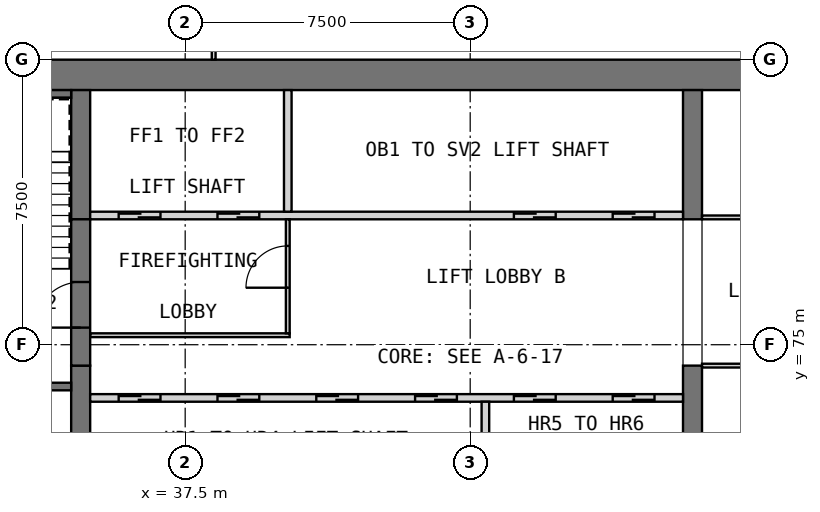
"""IFC4 building model, lengths in metres.
Left out: names, types, materials, properties, quantities, classifications, styles, units other than length and angle.
Written with IfcOpenShell. Run it as: python <this file> out.ifc"""

import sys

from ifc_helpers import new_model, si_unit, direction, frame, frame_2d, origin, place, context, subcontext, project, spatial, rectangle, extrude, element, fill, save


model = new_model("IFC4")
c1 = context("Model", 3, precision=1e-05, world=origin(), true_north=direction((0.0, 1.0)))
c2 = subcontext(c1, "Body", "Model", "MODEL_VIEW")
j1 = project(units=[si_unit("LENGTHUNIT", "METRE"), si_unit("PLANEANGLEUNIT", "RADIAN")], contexts=[c1])
p1 = place(None, origin())
s1 = spatial("IfcSite", under=j1, at=p1, CompositionType="ELEMENT")
p2 = place(p1, origin())
s2 = spatial("IfcBuilding", under=s1, at=p2, CompositionType="ELEMENT")
p3 = place(p2, frame((0.0, 0.0, 162.6)))
s3 = spatial("IfcBuildingStorey", under=s2, at=p3, CompositionType="ELEMENT", Elevation=162.6)
p4 = place(p3, frame((30.0, 82.1, 0.0), z_axis=(0.0, 0.0, 1.0), x_axis=(1.0, 0.0, 0.0)))
e1 = element("IfcWall", 1, at=p4, inside=s3, PredefinedType="SHEAR", context=c2, shape_type="SweptSolid", body=[
    extrude(rectangle(XDim=30.0, YDim=0.8, at=frame_2d((15.0, 0.0))), origin(), (0.0, 0.0, 1.0), 3.6),
])
p5 = place(p3, frame((34.75, 68.05, 0.0), z_axis=(0.0, 0.0, 1.0), x_axis=(0.0, 1.0, 0.0)))
e2 = element("IfcWall", 2, at=p5, inside=s3, PredefinedType="SHEAR", context=c2, shape_type="SweptSolid", body=[
    extrude(rectangle(XDim=6.4, YDim=0.5, at=frame_2d((3.2, 0.0))), origin(), (0.0, 0.0, 1.0), 3.6),
])
p6 = place(p3, frame((34.75, 78.3, 0.0), z_axis=(0.0, 0.0, 1.0), x_axis=(0.0, 1.0, 0.0)))
e3 = element("IfcWall", 3, at=p6, inside=s3, PredefinedType="SHEAR", context=c2, shape_type="SweptSolid", body=[
    extrude(rectangle(XDim=3.4, YDim=0.5, at=frame_2d((1.7, 0.0))), origin(), (0.0, 0.0, 1.0), 3.6),
])
p7 = place(p3, frame((50.85, 68.05, 0.0), z_axis=(0.0, 0.0, 1.0), x_axis=(0.0, 1.0, 0.0)))
e4 = element("IfcWall", 4, at=p7, inside=s3, PredefinedType="SHEAR", context=c2, shape_type="SweptSolid", body=[
    extrude(rectangle(XDim=6.4, YDim=0.5, at=frame_2d((3.2, 0.0))), origin(), (0.0, 0.0, 1.0), 3.6),
])
p8 = place(p3, frame((50.85, 78.3, 0.0), z_axis=(0.0, 0.0, 1.0), x_axis=(0.0, 1.0, 0.0)))
e5 = element("IfcWall", 5, at=p8, inside=s3, PredefinedType="SHEAR", context=c2, shape_type="SweptSolid", body=[
    extrude(rectangle(XDim=3.4, YDim=0.5, at=frame_2d((1.7, 0.0))), origin(), (0.0, 0.0, 1.0), 3.6),
])
p9 = place(p3, frame((35.0, 73.6, 0.0), z_axis=(0.0, 0.0, 1.0), x_axis=(1.0, 0.0, 0.0)))
e6 = element("IfcWall", 6, at=p9, inside=s3, PredefinedType="SOLIDWALL", context=c2, shape_type="SweptSolid", body=[
    extrude(rectangle(XDim=15.6, YDim=0.2, at=frame_2d((7.8, 0.0))), origin(), (0.0, 0.0, 1.0), 3.6),
])
p10 = place(p9, frame((0.75, 0.0, 0.0)))
e7 = element("IfcOpeningElement", 7, at=p10, cuts=e6, PredefinedType="OPENING", context=c2, shape_type="SweptSolid", body=[
    extrude(rectangle(XDim=1.1, YDim=2.1, at=frame_2d((0.55, 1.05))), frame((0.0, 0.11, 0.0), z_axis=(0.0, -1.0, 0.0), x_axis=(1.0, 0.0, 0.0)), (0.0, 0.0, 1.0), 0.22),
])
p11 = place(p9, frame((3.35, 0.0, 0.0)))
e8 = element("IfcOpeningElement", 8, at=p11, cuts=e6, PredefinedType="OPENING", context=c2, shape_type="SweptSolid", body=[
    extrude(rectangle(XDim=1.1, YDim=2.1, at=frame_2d((0.55, 1.05))), frame((0.0, 0.11, 0.0), z_axis=(0.0, -1.0, 0.0), x_axis=(1.0, 0.0, 0.0)), (0.0, 0.0, 1.0), 0.22),
])
p12 = place(p9, frame((5.95, 0.0, 0.0)))
e9 = element("IfcOpeningElement", 9, at=p12, cuts=e6, PredefinedType="OPENING", context=c2, shape_type="SweptSolid", body=[
    extrude(rectangle(XDim=1.1, YDim=2.1, at=frame_2d((0.55, 1.05))), frame((0.0, 0.11, 0.0), z_axis=(0.0, -1.0, 0.0), x_axis=(1.0, 0.0, 0.0)), (0.0, 0.0, 1.0), 0.22),
])
p13 = place(p9, frame((8.55, 0.0, 0.0)))
e10 = element("IfcOpeningElement", 10, at=p13, cuts=e6, PredefinedType="OPENING", context=c2, shape_type="SweptSolid", body=[
    extrude(rectangle(XDim=1.1, YDim=2.1, at=frame_2d((0.55, 1.05))), frame((0.0, 0.11, 0.0), z_axis=(0.0, -1.0, 0.0), x_axis=(1.0, 0.0, 0.0)), (0.0, 0.0, 1.0), 0.22),
])
p14 = place(p9, frame((11.15, 0.0, 0.0)))
e11 = element("IfcOpeningElement", 11, at=p14, cuts=e6, PredefinedType="OPENING", context=c2, shape_type="SweptSolid", body=[
    extrude(rectangle(XDim=1.1, YDim=2.1, at=frame_2d((0.55, 1.05))), frame((0.0, 0.11, 0.0), z_axis=(0.0, -1.0, 0.0), x_axis=(1.0, 0.0, 0.0)), (0.0, 0.0, 1.0), 0.22),
])
p15 = place(p9, frame((13.75, 0.0, 0.0)))
e12 = element("IfcOpeningElement", 12, at=p15, cuts=e6, PredefinedType="OPENING", context=c2, shape_type="SweptSolid", body=[
    extrude(rectangle(XDim=1.1, YDim=2.1, at=frame_2d((0.55, 1.05))), frame((0.0, 0.11, 0.0), z_axis=(0.0, -1.0, 0.0), x_axis=(1.0, 0.0, 0.0)), (0.0, 0.0, 1.0), 0.22),
])
p16 = place(p3, frame((45.4, 71.5, 0.0), z_axis=(0.0, 0.0, 1.0), x_axis=(0.0, 1.0, 0.0)))
e13 = element("IfcWall", 13, at=p16, inside=s3, PredefinedType="SOLIDWALL", context=c2, shape_type="SweptSolid", body=[
    extrude(rectangle(XDim=2.0, YDim=0.2, at=frame_2d((1.0, 0.0))), origin(), (0.0, 0.0, 1.0), 3.6),
])
p17 = place(p3, frame((35.0, 78.4, 0.0), z_axis=(0.0, 0.0, 1.0), x_axis=(1.0, 0.0, 0.0)))
e14 = element("IfcWall", 14, at=p17, inside=s3, PredefinedType="SOLIDWALL", context=c2, shape_type="SweptSolid", body=[
    extrude(rectangle(XDim=15.6, YDim=0.2, at=frame_2d((7.8, 0.0))), origin(), (0.0, 0.0, 1.0), 3.6),
])
p18 = place(p17, frame((0.75, 0.0, 0.0)))
e15 = element("IfcOpeningElement", 15, at=p18, cuts=e14, PredefinedType="OPENING", context=c2, shape_type="SweptSolid", body=[
    extrude(rectangle(XDim=1.1, YDim=2.1, at=frame_2d((0.55, 1.05))), frame((0.0, 0.11, 0.0), z_axis=(0.0, -1.0, 0.0), x_axis=(1.0, 0.0, 0.0)), (0.0, 0.0, 1.0), 0.22),
])
p19 = place(p17, frame((3.35, 0.0, 0.0)))
e16 = element("IfcOpeningElement", 16, at=p19, cuts=e14, PredefinedType="OPENING", context=c2, shape_type="SweptSolid", body=[
    extrude(rectangle(XDim=1.1, YDim=2.1, at=frame_2d((0.55, 1.05))), frame((0.0, 0.11, 0.0), z_axis=(0.0, -1.0, 0.0), x_axis=(1.0, 0.0, 0.0)), (0.0, 0.0, 1.0), 0.22),
])
p20 = place(p17, frame((11.15, 0.0, 0.0)))
e17 = element("IfcOpeningElement", 17, at=p20, cuts=e14, PredefinedType="OPENING", context=c2, shape_type="SweptSolid", body=[
    extrude(rectangle(XDim=1.1, YDim=2.1, at=frame_2d((0.55, 1.05))), frame((0.0, 0.11, 0.0), z_axis=(0.0, -1.0, 0.0), x_axis=(1.0, 0.0, 0.0)), (0.0, 0.0, 1.0), 0.22),
])
p21 = place(p17, frame((13.75, 0.0, 0.0)))
e18 = element("IfcOpeningElement", 18, at=p21, cuts=e14, PredefinedType="OPENING", context=c2, shape_type="SweptSolid", body=[
    extrude(rectangle(XDim=1.1, YDim=2.1, at=frame_2d((0.55, 1.05))), frame((0.0, 0.11, 0.0), z_axis=(0.0, -1.0, 0.0), x_axis=(1.0, 0.0, 0.0)), (0.0, 0.0, 1.0), 0.22),
])
p22 = place(p3, frame((40.2, 78.5, 0.0), z_axis=(0.0, 0.0, 1.0), x_axis=(0.0, 1.0, 0.0)))
e19 = element("IfcWall", 19, at=p22, inside=s3, PredefinedType="SOLIDWALL", context=c2, shape_type="SweptSolid", body=[
    extrude(rectangle(XDim=3.2, YDim=0.2, at=frame_2d((1.6, 0.0))), origin(), (0.0, 0.0, 1.0), 3.6),
])
p23 = place(p3, frame((35.0, 75.25, 0.0), z_axis=(0.0, 0.0, 1.0), x_axis=(1.0, 0.0, 0.0)))
e20 = element("IfcWall", 20, at=p23, inside=s3, PredefinedType="PARTITIONING", context=c2, shape_type="SweptSolid", body=[
    extrude(rectangle(XDim=5.25, YDim=0.1, at=frame_2d((2.625, 0.0))), origin(), (0.0, 0.0, 1.0), 3.19),
])
p24 = place(p3, frame((40.2, 75.3, 0.0), z_axis=(0.0, 0.0, 1.0), x_axis=(0.0, 1.0, 0.0)))
e21 = element("IfcWall", 21, at=p24, inside=s3, PredefinedType="PARTITIONING", context=c2, shape_type="SweptSolid", body=[
    extrude(rectangle(XDim=3.0, YDim=0.1, at=frame_2d((1.5, 0.0))), origin(), (0.0, 0.0, 1.0), 3.19),
])
p25 = place(p24, frame((1.2, 0.0, 0.0)))
e22 = element("IfcOpeningElement", 22, at=p25, cuts=e21, PredefinedType="OPENING", context=c2, shape_type="SweptSolid", body=[
    extrude(rectangle(XDim=1.1, YDim=2.1, at=frame_2d((0.55, 1.05))), frame((0.0, 0.06, 0.0), z_axis=(0.0, -1.0, 0.0), x_axis=(1.0, 0.0, 0.0)), (0.0, 0.0, 1.0), 0.12),
])
p26 = place(p3, frame((34.75, 74.45, 0.0), z_axis=(0.0, 0.0, 1.0), x_axis=(0.0, 1.0, 0.0)))
e23 = element("IfcWall", 23, at=p26, inside=s3, PredefinedType="SOLIDWALL", context=c2, shape_type="SweptSolid", body=[
    extrude(rectangle(XDim=3.85, YDim=0.5, at=frame_2d((1.925, 0.0))), origin(), (0.0, 0.0, 1.0), 2.4),
])
p27 = place(p26, frame((1.0, 0.0, 0.0)))
e24 = element("IfcOpeningElement", 24, at=p27, cuts=e23, PredefinedType="OPENING", context=c2, shape_type="SweptSolid", body=[
    extrude(rectangle(XDim=1.2, YDim=2.1, at=frame_2d((0.6, 1.05))), frame((0.0, 0.26, 0.0), z_axis=(0.0, -1.0, 0.0), x_axis=(1.0, 0.0, 0.0)), (0.0, 0.0, 1.0), 0.52),
])
p28 = place(p3, frame((30.8, 73.9, 0.0), z_axis=(0.0, 0.0, 1.0), x_axis=(1.0, 0.0, 0.0)))
e25 = element("IfcWall", 25, at=p28, inside=s3, PredefinedType="SOLIDWALL", context=c2, shape_type="SweptSolid", body=[
    extrude(rectangle(XDim=3.7, YDim=0.2, at=frame_2d((1.85, 0.0))), origin(), (0.0, 0.0, 1.0), 3.19),
])
p29 = place(p28, frame((1.5, 0.0, 0.0)))
e26 = element("IfcOpeningElement", 26, at=p29, cuts=e25, PredefinedType="OPENING", context=c2, shape_type="SweptSolid", body=[
    extrude(rectangle(XDim=0.9, YDim=2.1, at=frame_2d((0.45, 1.05))), frame((0.0, 0.11, 0.0), z_axis=(0.0, -1.0, 0.0), x_axis=(1.0, 0.0, 0.0)), (0.0, 0.0, 1.0), 0.22),
])
p30 = place(p3, frame((31.0, 81.6, 0.0), z_axis=(0.0, 0.0, 1.0), x_axis=(1.0, 0.0, 0.0)))
e27 = element("IfcWall", 27, at=p30, inside=s3, PredefinedType="SOLIDWALL", context=c2, shape_type="SweptSolid", body=[
    extrude(rectangle(XDim=3.5, YDim=0.2, at=frame_2d((1.75, 0.0))), origin(), (0.0, 0.0, 1.0), 3.19),
])
p31 = place(p3, frame((51.1, 74.45, 0.0), z_axis=(0.0, 0.0, 1.0), x_axis=(1.0, 0.0, 0.0)))
e28 = element("IfcWall", 28, at=p31, inside=s3, PredefinedType="PARTITIONING", context=c2, shape_type="SweptSolid", body=[
    extrude(rectangle(XDim=8.1, YDim=0.1, at=frame_2d((4.05, 0.0))), origin(), (0.0, 0.0, 1.0), 3.19),
])
p32 = place(p31, frame((3.6, 0.0, 0.0)))
e29 = element("IfcOpeningElement", 29, at=p32, cuts=e28, PredefinedType="OPENING", context=c2, shape_type="SweptSolid", body=[
    extrude(rectangle(XDim=0.9, YDim=2.1, at=frame_2d((0.45, 1.05))), frame((0.0, 0.06, 0.0), z_axis=(0.0, -1.0, 0.0), x_axis=(1.0, 0.0, 0.0)), (0.0, 0.0, 1.0), 0.12),
])
p33 = place(p3, frame((51.1, 78.35, 0.0), z_axis=(0.0, 0.0, 1.0), x_axis=(1.0, 0.0, 0.0)))
e30 = element("IfcWall", 30, at=p33, inside=s3, PredefinedType="PARTITIONING", context=c2, shape_type="SweptSolid", body=[
    extrude(rectangle(XDim=8.1, YDim=0.1, at=frame_2d((4.05, 0.0))), origin(), (0.0, 0.0, 1.0), 3.19),
])
p34 = place(p33, frame((3.6, 0.0, 0.0)))
e31 = element("IfcOpeningElement", 31, at=p34, cuts=e30, PredefinedType="OPENING", context=c2, shape_type="SweptSolid", body=[
    extrude(rectangle(XDim=0.9, YDim=2.1, at=frame_2d((0.45, 1.05))), frame((0.0, 0.06, 0.0), z_axis=(0.0, -1.0, 0.0), x_axis=(1.0, 0.0, 0.0)), (0.0, 0.0, 1.0), 0.12),
])
p35 = place(p3, frame((38.25, 82.5, 0.0), z_axis=(0.0, 0.0, 1.0), x_axis=(0.0, 1.0, 0.0)))
e32 = element("IfcWall", 32, at=p35, inside=s3, PredefinedType="PARTITIONING", context=c2, shape_type="SweptSolid", body=[
    extrude(rectangle(XDim=3.675, YDim=0.1, at=frame_2d((1.837, 0.0))), origin(), (0.0, 0.0, 1.0), 3.2),
])
p36 = place(p10, origin())
e33 = element("IfcDoor", 33, at=p36, inside=s3, OperationType="DOUBLE_DOOR_SLIDING", PredefinedType="DOOR", context=c2, shape_type="SweptSolid", body=[
    extrude(rectangle(XDim=1.1, YDim=2.1, at=frame_2d((0.55, 1.05))), frame((0.0, 0.025, 0.0), z_axis=(0.0, -1.0, 0.0), x_axis=(1.0, 0.0, 0.0)), (0.0, 0.0, 1.0), 0.05),
])
fill(e7, e33)
p37 = place(p11, origin())
e34 = element("IfcDoor", 34, at=p37, inside=s3, OperationType="DOUBLE_DOOR_SLIDING", PredefinedType="DOOR", context=c2, shape_type="SweptSolid", body=[
    extrude(rectangle(XDim=1.1, YDim=2.1, at=frame_2d((0.55, 1.05))), frame((0.0, 0.025, 0.0), z_axis=(0.0, -1.0, 0.0), x_axis=(1.0, 0.0, 0.0)), (0.0, 0.0, 1.0), 0.05),
])
fill(e8, e34)
p38 = place(p12, origin())
e35 = element("IfcDoor", 35, at=p38, inside=s3, OperationType="DOUBLE_DOOR_SLIDING", PredefinedType="DOOR", context=c2, shape_type="SweptSolid", body=[
    extrude(rectangle(XDim=1.1, YDim=2.1, at=frame_2d((0.55, 1.05))), frame((0.0, 0.025, 0.0), z_axis=(0.0, -1.0, 0.0), x_axis=(1.0, 0.0, 0.0)), (0.0, 0.0, 1.0), 0.05),
])
fill(e9, e35)
p39 = place(p13, origin())
e36 = element("IfcDoor", 36, at=p39, inside=s3, OperationType="DOUBLE_DOOR_SLIDING", PredefinedType="DOOR", context=c2, shape_type="SweptSolid", body=[
    extrude(rectangle(XDim=1.1, YDim=2.1, at=frame_2d((0.55, 1.05))), frame((0.0, 0.025, 0.0), z_axis=(0.0, -1.0, 0.0), x_axis=(1.0, 0.0, 0.0)), (0.0, 0.0, 1.0), 0.05),
])
fill(e10, e36)
p40 = place(p14, origin())
e37 = element("IfcDoor", 37, at=p40, inside=s3, OperationType="DOUBLE_DOOR_SLIDING", PredefinedType="DOOR", context=c2, shape_type="SweptSolid", body=[
    extrude(rectangle(XDim=1.1, YDim=2.1, at=frame_2d((0.55, 1.05))), frame((0.0, 0.025, 0.0), z_axis=(0.0, -1.0, 0.0), x_axis=(1.0, 0.0, 0.0)), (0.0, 0.0, 1.0), 0.05),
])
fill(e11, e37)
p41 = place(p15, origin())
e38 = element("IfcDoor", 38, at=p41, inside=s3, OperationType="DOUBLE_DOOR_SLIDING", PredefinedType="DOOR", context=c2, shape_type="SweptSolid", body=[
    extrude(rectangle(XDim=1.1, YDim=2.1, at=frame_2d((0.55, 1.05))), frame((0.0, 0.025, 0.0), z_axis=(0.0, -1.0, 0.0), x_axis=(1.0, 0.0, 0.0)), (0.0, 0.0, 1.0), 0.05),
])
fill(e12, e38)
p42 = place(p18, origin())
e39 = element("IfcDoor", 39, at=p42, inside=s3, OperationType="DOUBLE_DOOR_SLIDING", PredefinedType="DOOR", context=c2, shape_type="SweptSolid", body=[
    extrude(rectangle(XDim=1.1, YDim=2.1, at=frame_2d((0.55, 1.05))), frame((0.0, 0.025, 0.0), z_axis=(0.0, -1.0, 0.0), x_axis=(1.0, 0.0, 0.0)), (0.0, 0.0, 1.0), 0.05),
])
fill(e15, e39)
p43 = place(p19, origin())
e40 = element("IfcDoor", 40, at=p43, inside=s3, OperationType="DOUBLE_DOOR_SLIDING", PredefinedType="DOOR", context=c2, shape_type="SweptSolid", body=[
    extrude(rectangle(XDim=1.1, YDim=2.1, at=frame_2d((0.55, 1.05))), frame((0.0, 0.025, 0.0), z_axis=(0.0, -1.0, 0.0), x_axis=(1.0, 0.0, 0.0)), (0.0, 0.0, 1.0), 0.05),
])
fill(e16, e40)
p44 = place(p20, origin())
e41 = element("IfcDoor", 41, at=p44, inside=s3, OperationType="DOUBLE_DOOR_SLIDING", PredefinedType="DOOR", context=c2, shape_type="SweptSolid", body=[
    extrude(rectangle(XDim=1.1, YDim=2.1, at=frame_2d((0.55, 1.05))), frame((0.0, 0.025, 0.0), z_axis=(0.0, -1.0, 0.0), x_axis=(1.0, 0.0, 0.0)), (0.0, 0.0, 1.0), 0.05),
])
fill(e17, e41)
p45 = place(p21, origin())
e42 = element("IfcDoor", 42, at=p45, inside=s3, OperationType="DOUBLE_DOOR_SLIDING", PredefinedType="DOOR", context=c2, shape_type="SweptSolid", body=[
    extrude(rectangle(XDim=1.1, YDim=2.1, at=frame_2d((0.55, 1.05))), frame((0.0, 0.025, 0.0), z_axis=(0.0, -1.0, 0.0), x_axis=(1.0, 0.0, 0.0)), (0.0, 0.0, 1.0), 0.05),
])
fill(e18, e42)
p46 = place(p25, origin())
e43 = element("IfcDoor", 43, at=p46, inside=s3, OperationType="SINGLE_SWING_LEFT", PredefinedType="DOOR", context=c2, shape_type="SweptSolid", body=[
    extrude(rectangle(XDim=1.1, YDim=2.1, at=frame_2d((0.55, 1.05))), frame((0.0, 0.025, 0.0), z_axis=(0.0, -1.0, 0.0), x_axis=(1.0, 0.0, 0.0)), (0.0, 0.0, 1.0), 0.05),
])
fill(e22, e43)
p47 = place(p27, origin())
e44 = element("IfcDoor", 44, at=p47, inside=s3, OperationType="SINGLE_SWING_RIGHT", PredefinedType="DOOR", context=c2, shape_type="SweptSolid", body=[
    extrude(rectangle(XDim=1.2, YDim=2.1, at=frame_2d((0.6, 1.05))), frame((0.0, 0.025, 0.0), z_axis=(0.0, -1.0, 0.0), x_axis=(1.0, 0.0, 0.0)), (0.0, 0.0, 1.0), 0.05),
])
fill(e24, e44)
save(model, sys.argv[1])
